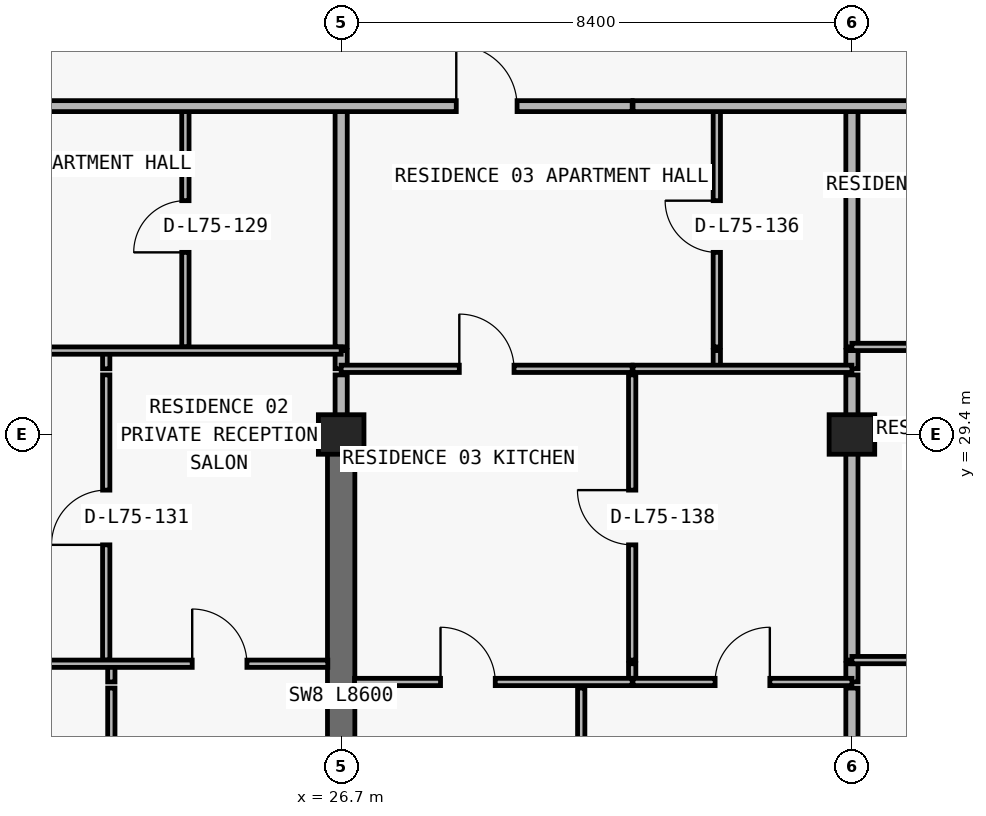
"""IFC4 building model, lengths in metres.
Left out: names, types, materials, properties, quantities, classifications, styles, units other than length and angle.
Written with IfcOpenShell. Run it as: python <this file> out.ifc"""

import sys

from ifc_helpers import new_model, si_unit, direction, frame, frame_2d, origin, origin_2d, place, context, subcontext, project, spatial, rectangle, extrude, element, fill, save


model = new_model("IFC4")
c1 = context("Model", 3, precision=1e-05, world=origin(), true_north=direction((0.0, 1.0)))
c2 = subcontext(c1, "Body", "Model", "MODEL_VIEW")
j1 = project(units=[si_unit("LENGTHUNIT", "METRE"), si_unit("PLANEANGLEUNIT", "RADIAN")], contexts=[c1])
p1 = place(None, origin())
s1 = spatial("IfcSite", under=j1, at=p1, CompositionType="ELEMENT")
p2 = place(p1, origin())
s2 = spatial("IfcBuilding", under=s1, at=p2, CompositionType="ELEMENT")
p3 = place(p2, frame((0.0, 0.0, 266.1)))
s3 = spatial("IfcBuildingStorey", under=s2, at=p3, CompositionType="ELEMENT", Elevation=266.1)
for number, where, z_axis, x_axis in (
    (1, (26.7, 29.4, 0.0), (0.0, 0.0, 1.0), (1.0, 0.0, 0.0)),
    (2, (35.1, 29.4, 0.0), (0.0, 0.0, 1.0), (1.0, 0.0, 0.0)),
):
    element("IfcColumn", number, at=place(p3, frame(where, z_axis=z_axis, x_axis=x_axis)), inside=s3, PredefinedType="COLUMN", context=c2, shape_type="SweptSolid", body=[
        extrude(rectangle(XDim=0.75, YDim=0.65, at=origin_2d()), origin(), (0.0, 0.0, 1.0), 3.0),
    ])
p4 = place(p3, frame((26.7, 20.8, 0.0), z_axis=(0.0, 0.0, 1.0), x_axis=(0.0, 1.0, 0.0)))
e3 = element("IfcWall", 3, at=p4, inside=s3, PredefinedType="SHEAR", context=c2, shape_type="SweptSolid", body=[
    extrude(rectangle(XDim=8.6, YDim=0.45, at=frame_2d((4.3, 0.0))), origin(), (0.0, 0.0, 1.0), 3.0),
])
p5 = place(p3, frame((22.836, 25.69, 0.0), z_axis=(0.0, 0.0, 1.0), x_axis=(0.0, 1.0, 0.0)))
e4 = element("IfcWall", 4, at=p5, inside=s3, PredefinedType="PARTITIONING", context=c2, shape_type="SweptSolid", body=[
    extrude(rectangle(XDim=4.69, YDim=0.12, at=frame_2d((2.345, 0.0))), origin(), (0.0, 0.0, 1.0), 3.0),
])
p6 = place(p5, frame((1.895, 0.0, 0.0)))
e5 = element("IfcOpeningElement", 5, at=p6, cuts=e4, PredefinedType="OPENING", context=c2, shape_type="SweptSolid", body=[
    extrude(rectangle(XDim=0.9, YDim=2.15, at=frame_2d((0.45, 1.075))), frame((0.0, 0.07, 0.0), z_axis=(0.0, -1.0, 0.0), x_axis=(1.0, 0.0, 0.0)), (0.0, 0.0, 1.0), 0.14),
])
p7 = place(p3, frame((22.836, 30.48, 0.0), z_axis=(0.0, 0.0, 1.0), x_axis=(0.0, 1.0, 0.0)))
e6 = element("IfcWall", 6, at=p7, inside=s3, PredefinedType="PARTITIONING", context=c2, shape_type="SweptSolid", body=[
    extrude(rectangle(XDim=0.3, YDim=0.12, at=frame_2d((0.15, 0.0))), origin(), (0.0, 0.0, 1.0), 3.0),
])
p8 = place(p3, frame((22.92, 13.34, 0.0), z_axis=(0.0, 0.0, 1.0), x_axis=(0.0, 1.0, 0.0)))
e7 = element("IfcWall", 7, at=p8, inside=s3, PredefinedType="PARTITIONING", context=c2, shape_type="SweptSolid", body=[
    extrude(rectangle(XDim=11.89, YDim=0.12, at=frame_2d((5.945, 0.0))), origin(), (0.0, 0.0, 1.0), 3.0),
])
p9 = place(p3, frame((22.92, 25.33, 0.0), z_axis=(0.0, 0.0, 1.0), x_axis=(0.0, 1.0, 0.0)))
e8 = element("IfcWall", 8, at=p9, inside=s3, PredefinedType="PARTITIONING", context=c2, shape_type="SweptSolid", body=[
    extrude(rectangle(XDim=0.3, YDim=0.12, at=frame_2d((0.15, 0.0))), origin(), (0.0, 0.0, 1.0), 3.0),
])
p10 = place(p3, frame((24.138, 30.84, 0.0), z_axis=(0.0, 0.0, 1.0), x_axis=(0.0, 1.0, 0.0)))
e9 = element("IfcWall", 9, at=p10, inside=s3, PredefinedType="PARTITIONING", context=c2, shape_type="SweptSolid", body=[
    extrude(rectangle(XDim=3.96, YDim=0.12, at=frame_2d((1.98, 0.0))), origin(), (0.0, 0.0, 1.0), 3.0),
])
p11 = place(p10, frame((1.555, 0.0, 0.0)))
e10 = element("IfcOpeningElement", 10, at=p11, cuts=e9, PredefinedType="OPENING", context=c2, shape_type="SweptSolid", body=[
    extrude(rectangle(XDim=0.85, YDim=2.1, at=frame_2d((0.425, 1.05))), frame((0.0, 0.07, 0.0), z_axis=(0.0, -1.0, 0.0), x_axis=(1.0, 0.0, 0.0)), (0.0, 0.0, 1.0), 0.14),
])
p12 = place(p3, frame((26.7, 29.405, 0.0), z_axis=(0.0, 0.0, 1.0), x_axis=(0.0, 1.0, 0.0)))
e11 = element("IfcWall", 11, at=p12, inside=s3, PredefinedType="PARTITIONING", context=c2, shape_type="SweptSolid", body=[
    extrude(rectangle(XDim=0.975, YDim=0.2, at=frame_2d((0.487, 0.0))), origin(), (0.0, 0.0, 1.0), 2.285),
])
p13 = place(p3, frame((26.7, 30.48, 0.0), z_axis=(0.0, 0.0, 1.0), x_axis=(0.0, 1.0, 0.0)))
e12 = element("IfcWall", 12, at=p13, inside=s3, PredefinedType="PARTITIONING", context=c2, shape_type="SweptSolid", body=[
    extrude(rectangle(XDim=0.3, YDim=0.2, at=frame_2d((0.15, 0.0))), origin(), (0.0, 0.0, 1.0), 2.285),
])
p14 = place(p3, frame((26.7, 30.84, 0.0), z_axis=(0.0, 0.0, 1.0), x_axis=(0.0, 1.0, 0.0)))
e13 = element("IfcWall", 13, at=p14, inside=s3, PredefinedType="PARTITIONING", context=c2, shape_type="SweptSolid", body=[
    extrude(rectangle(XDim=3.96, YDim=0.2, at=frame_2d((1.98, 0.0))), origin(), (0.0, 0.0, 1.0), 2.285),
])
p15 = place(p3, frame((30.648, 13.34, 0.0), z_axis=(0.0, 0.0, 1.0), x_axis=(0.0, 1.0, 0.0)))
e14 = element("IfcWall", 14, at=p15, inside=s3, PredefinedType="PARTITIONING", context=c2, shape_type="SweptSolid", body=[
    extrude(rectangle(XDim=11.89, YDim=0.12, at=frame_2d((5.945, 0.0))), origin(), (0.0, 0.0, 1.0), 3.0),
])
p16 = place(p3, frame((31.486, 25.33, 0.0), z_axis=(0.0, 0.0, 1.0), x_axis=(0.0, 1.0, 0.0)))
e15 = element("IfcWall", 15, at=p16, inside=s3, PredefinedType="PARTITIONING", context=c2, shape_type="SweptSolid", body=[
    extrude(rectangle(XDim=0.3, YDim=0.12, at=frame_2d((0.15, 0.0))), origin(), (0.0, 0.0, 1.0), 3.0),
])
p17 = place(p3, frame((31.486, 25.69, 0.0), z_axis=(0.0, 0.0, 1.0), x_axis=(0.0, 1.0, 0.0)))
e16 = element("IfcWall", 16, at=p17, inside=s3, PredefinedType="PARTITIONING", context=c2, shape_type="SweptSolid", body=[
    extrude(rectangle(XDim=4.69, YDim=0.12, at=frame_2d((2.345, 0.0))), origin(), (0.0, 0.0, 1.0), 3.0),
])
p18 = place(p17, frame((1.895, 0.0, 0.0)))
e17 = element("IfcOpeningElement", 17, at=p18, cuts=e16, PredefinedType="OPENING", context=c2, shape_type="SweptSolid", body=[
    extrude(rectangle(XDim=0.9, YDim=2.15, at=frame_2d((0.45, 1.075))), frame((0.0, 0.07, 0.0), z_axis=(0.0, -1.0, 0.0), x_axis=(1.0, 0.0, 0.0)), (0.0, 0.0, 1.0), 0.14),
])
p19 = place(p3, frame((32.878, 30.48, 0.0), z_axis=(0.0, 0.0, 1.0), x_axis=(0.0, 1.0, 0.0)))
e18 = element("IfcWall", 18, at=p19, inside=s3, PredefinedType="PARTITIONING", context=c2, shape_type="SweptSolid", body=[
    extrude(rectangle(XDim=0.3, YDim=0.12, at=frame_2d((0.15, 0.0))), origin(), (0.0, 0.0, 1.0), 3.0),
])
p20 = place(p3, frame((32.878, 30.84, 0.0), z_axis=(0.0, 0.0, 1.0), x_axis=(0.0, 1.0, 0.0)))
e19 = element("IfcWall", 19, at=p20, inside=s3, PredefinedType="PARTITIONING", context=c2, shape_type="SweptSolid", body=[
    extrude(rectangle(XDim=3.96, YDim=0.12, at=frame_2d((1.98, 0.0))), origin(), (0.0, 0.0, 1.0), 3.0),
])
p21 = place(p20, frame((1.555, 0.0, 0.0)))
e20 = element("IfcOpeningElement", 20, at=p21, cuts=e19, PredefinedType="OPENING", context=c2, shape_type="SweptSolid", body=[
    extrude(rectangle(XDim=0.85, YDim=2.1, at=frame_2d((0.425, 1.05))), frame((0.0, 0.07, 0.0), z_axis=(0.0, -1.0, 0.0), x_axis=(1.0, 0.0, 0.0)), (0.0, 0.0, 1.0), 0.14),
])
p22 = place(p3, frame((35.1, 13.34, 0.0), z_axis=(0.0, 0.0, 1.0), x_axis=(0.0, 1.0, 0.0)))
e21 = element("IfcWall", 21, at=p22, inside=s3, PredefinedType="PARTITIONING", context=c2, shape_type="SweptSolid", body=[
    extrude(rectangle(XDim=11.89, YDim=0.2, at=frame_2d((5.945, 0.0))), origin(), (0.0, 0.0, 1.0), 2.213),
])
p23 = place(p3, frame((35.1, 25.33, 0.0), z_axis=(0.0, 0.0, 1.0), x_axis=(0.0, 1.0, 0.0)))
e22 = element("IfcWall", 22, at=p23, inside=s3, PredefinedType="PARTITIONING", context=c2, shape_type="SweptSolid", body=[
    extrude(rectangle(XDim=0.3, YDim=0.2, at=frame_2d((0.15, 0.0))), origin(), (0.0, 0.0, 1.0), 2.213),
])
p24 = place(p3, frame((35.1, 25.69, 0.0), z_axis=(0.0, 0.0, 1.0), x_axis=(0.0, 1.0, 0.0)))
e23 = element("IfcWall", 23, at=p24, inside=s3, PredefinedType="PARTITIONING", context=c2, shape_type="SweptSolid", body=[
    extrude(rectangle(XDim=4.69, YDim=0.2, at=frame_2d((2.345, 0.0))), origin(), (0.0, 0.0, 1.0), 2.213),
])
p25 = place(p3, frame((35.1, 30.48, 0.0), z_axis=(0.0, 0.0, 1.0), x_axis=(0.0, 1.0, 0.0)))
e24 = element("IfcWall", 24, at=p25, inside=s3, PredefinedType="PARTITIONING", context=c2, shape_type="SweptSolid", body=[
    extrude(rectangle(XDim=0.3, YDim=0.2, at=frame_2d((0.15, 0.0))), origin(), (0.0, 0.0, 1.0), 2.213),
])
p26 = place(p3, frame((35.1, 30.84, 0.0), z_axis=(0.0, 0.0, 1.0), x_axis=(0.0, 1.0, 0.0)))
e25 = element("IfcWall", 25, at=p26, inside=s3, PredefinedType="PARTITIONING", context=c2, shape_type="SweptSolid", body=[
    extrude(rectangle(XDim=3.96, YDim=0.2, at=frame_2d((1.98, 0.0))), origin(), (0.0, 0.0, 1.0), 2.213),
])
p27 = place(p3, frame((26.92, 25.33, 0.0), z_axis=(0.0, 0.0, 1.0), x_axis=(1.0, 0.0, 0.0)))
e26 = element("IfcWall", 26, at=p27, inside=s3, PredefinedType="PARTITIONING", context=c2, shape_type="SweptSolid", body=[
    extrude(rectangle(XDim=4.566, YDim=0.12, at=frame_2d((2.283, 0.0))), origin(), (0.0, 0.0, 1.0), 3.0),
])
p28 = place(p27, frame((1.414, 0.0, 0.0)))
e27 = element("IfcOpeningElement", 27, at=p28, cuts=e26, PredefinedType="OPENING", context=c2, shape_type="SweptSolid", body=[
    extrude(rectangle(XDim=0.9, YDim=2.15, at=frame_2d((0.45, 1.075))), frame((0.0, 0.07, 0.0), z_axis=(0.0, -1.0, 0.0), x_axis=(1.0, 0.0, 0.0)), (0.0, 0.0, 1.0), 0.14),
])
p29 = place(p3, frame((31.5, 25.33, 0.0), z_axis=(0.0, 0.0, 1.0), x_axis=(1.0, 0.0, 0.0)))
e28 = element("IfcWall", 28, at=p29, inside=s3, PredefinedType="PARTITIONING", context=c2, shape_type="SweptSolid", body=[
    extrude(rectangle(XDim=3.6, YDim=0.12, at=frame_2d((1.8, 0.0))), origin(), (0.0, 0.0, 1.0), 3.0),
])
p30 = place(p29, frame((1.35, 0.0, 0.0)))
e29 = element("IfcOpeningElement", 29, at=p30, cuts=e28, PredefinedType="OPENING", context=c2, shape_type="SweptSolid", body=[
    extrude(rectangle(XDim=0.9, YDim=2.15, at=frame_2d((0.45, 1.075))), frame((0.0, 0.07, 0.0), z_axis=(0.0, -1.0, 0.0), x_axis=(1.0, 0.0, 0.0)), (0.0, 0.0, 1.0), 0.14),
])
p31 = place(p3, frame((18.3, 25.63, 0.0), z_axis=(0.0, 0.0, 1.0), x_axis=(1.0, 0.0, 0.0)))
e30 = element("IfcWall", 30, at=p31, inside=s3, PredefinedType="PARTITIONING", context=c2, shape_type="SweptSolid", body=[
    extrude(rectangle(XDim=8.18, YDim=0.12, at=frame_2d((4.09, 0.0))), origin(), (0.0, 0.0, 1.0), 3.0),
])
p32 = place(p31, frame((1.818, 0.0, 0.0)))
e31 = element("IfcOpeningElement", 31, at=p32, cuts=e30, PredefinedType="OPENING", context=c2, shape_type="SweptSolid", body=[
    extrude(rectangle(XDim=0.9, YDim=2.15, at=frame_2d((0.45, 1.075))), frame((0.0, 0.07, 0.0), z_axis=(0.0, -1.0, 0.0), x_axis=(1.0, 0.0, 0.0)), (0.0, 0.0, 1.0), 0.14),
])
p33 = place(p31, frame((5.95, 0.0, 0.0)))
e32 = element("IfcOpeningElement", 32, at=p33, cuts=e30, PredefinedType="OPENING", context=c2, shape_type="SweptSolid", body=[
    extrude(rectangle(XDim=0.9, YDim=2.15, at=frame_2d((0.45, 1.075))), frame((0.0, 0.07, 0.0), z_axis=(0.0, -1.0, 0.0), x_axis=(1.0, 0.0, 0.0)), (0.0, 0.0, 1.0), 0.14),
])
p34 = place(p3, frame((35.1, 25.69, 0.0), z_axis=(0.0, 0.0, 1.0), x_axis=(1.0, 0.0, 0.0)))
e33 = element("IfcWall", 33, at=p34, inside=s3, PredefinedType="PARTITIONING", context=c2, shape_type="SweptSolid", body=[
    extrude(rectangle(XDim=7.6, YDim=0.12, at=frame_2d((3.8, 0.0))), origin(), (0.0, 0.0, 1.0), 3.0),
])
p35 = place(p34, frame((1.477, 0.0, 0.0)))
e34 = element("IfcOpeningElement", 34, at=p35, cuts=e33, PredefinedType="OPENING", context=c2, shape_type="SweptSolid", body=[
    extrude(rectangle(XDim=0.9, YDim=2.15, at=frame_2d((0.45, 1.075))), frame((0.0, 0.07, 0.0), z_axis=(0.0, -1.0, 0.0), x_axis=(1.0, 0.0, 0.0)), (0.0, 0.0, 1.0), 0.14),
])
p36 = place(p34, frame((5.44, 0.0, 0.0)))
e35 = element("IfcOpeningElement", 35, at=p36, cuts=e33, PredefinedType="OPENING", context=c2, shape_type="SweptSolid", body=[
    extrude(rectangle(XDim=0.9, YDim=2.15, at=frame_2d((0.45, 1.075))), frame((0.0, 0.07, 0.0), z_axis=(0.0, -1.0, 0.0), x_axis=(1.0, 0.0, 0.0)), (0.0, 0.0, 1.0), 0.14),
])
p37 = place(p3, frame((26.7, 30.48, 0.0), z_axis=(0.0, 0.0, 1.0), x_axis=(1.0, 0.0, 0.0)))
e36 = element("IfcWall", 36, at=p37, inside=s3, PredefinedType="PARTITIONING", context=c2, shape_type="SweptSolid", body=[
    extrude(rectangle(XDim=4.786, YDim=0.12, at=frame_2d((2.393, 0.0))), origin(), (0.0, 0.0, 1.0), 3.0),
])
p38 = place(p37, frame((1.943, 0.0, 0.0)))
e37 = element("IfcOpeningElement", 37, at=p38, cuts=e36, PredefinedType="OPENING", context=c2, shape_type="SweptSolid", body=[
    extrude(rectangle(XDim=0.9, YDim=2.15, at=frame_2d((0.45, 1.075))), frame((0.0, 0.07, 0.0), z_axis=(0.0, -1.0, 0.0), x_axis=(1.0, 0.0, 0.0)), (0.0, 0.0, 1.0), 0.14),
])
p39 = place(p3, frame((31.5, 30.48, 0.0), z_axis=(0.0, 0.0, 1.0), x_axis=(1.0, 0.0, 0.0)))
e38 = element("IfcWall", 38, at=p39, inside=s3, PredefinedType="PARTITIONING", context=c2, shape_type="SweptSolid", body=[
    extrude(rectangle(XDim=3.6, YDim=0.12, at=frame_2d((1.8, 0.0))), origin(), (0.0, 0.0, 1.0), 3.0),
])
p40 = place(p3, frame((18.3, 30.78, 0.0), z_axis=(0.0, 0.0, 1.0), x_axis=(1.0, 0.0, 0.0)))
e39 = element("IfcWall", 39, at=p40, inside=s3, PredefinedType="PARTITIONING", context=c2, shape_type="SweptSolid", body=[
    extrude(rectangle(XDim=8.4, YDim=0.12, at=frame_2d((4.2, 0.0))), origin(), (0.0, 0.0, 1.0), 3.0),
])
p41 = place(p40, frame((1.818, 0.0, 0.0)))
e40 = element("IfcOpeningElement", 40, at=p41, cuts=e39, PredefinedType="OPENING", context=c2, shape_type="SweptSolid", body=[
    extrude(rectangle(XDim=0.9, YDim=2.15, at=frame_2d((0.45, 1.075))), frame((0.0, 0.07, 0.0), z_axis=(0.0, -1.0, 0.0), x_axis=(1.0, 0.0, 0.0)), (0.0, 0.0, 1.0), 0.14),
])
p42 = place(p3, frame((35.1, 30.84, 0.0), z_axis=(0.0, 0.0, 1.0), x_axis=(1.0, 0.0, 0.0)))
e41 = element("IfcWall", 41, at=p42, inside=s3, PredefinedType="PARTITIONING", context=c2, shape_type="SweptSolid", body=[
    extrude(rectangle(XDim=7.6, YDim=0.12, at=frame_2d((3.8, 0.0))), origin(), (0.0, 0.0, 1.0), 3.0),
])
p43 = place(p42, frame((1.477, 0.0, 0.0)))
e42 = element("IfcOpeningElement", 42, at=p43, cuts=e41, PredefinedType="OPENING", context=c2, shape_type="SweptSolid", body=[
    extrude(rectangle(XDim=0.9, YDim=2.15, at=frame_2d((0.45, 1.075))), frame((0.0, 0.07, 0.0), z_axis=(0.0, -1.0, 0.0), x_axis=(1.0, 0.0, 0.0)), (0.0, 0.0, 1.0), 0.14),
])
p44 = place(p3, frame((15.203, 34.8, 0.0), z_axis=(0.0, 0.0, 1.0), x_axis=(1.0, 0.0, 0.0)))
e43 = element("IfcWall", 43, at=p44, inside=s3, PredefinedType="PARTITIONING", context=c2, shape_type="SweptSolid", body=[
    extrude(rectangle(XDim=16.283, YDim=0.18, at=frame_2d((8.142, 0.0))), origin(), (0.0, 0.0, 1.0), 3.0),
])
p45 = place(p44, frame((5.516, 0.0, 0.0)))
e44 = element("IfcOpeningElement", 44, at=p45, cuts=e43, PredefinedType="OPENING", context=c2, shape_type="SweptSolid", body=[
    extrude(rectangle(XDim=1.0, YDim=2.2, at=frame_2d((0.5, 1.1))), frame((0.0, 0.1, 0.0), z_axis=(0.0, -1.0, 0.0), x_axis=(1.0, 0.0, 0.0)), (0.0, 0.0, 1.0), 0.2),
])
p46 = place(p44, frame((13.39, 0.0, 0.0)))
e45 = element("IfcOpeningElement", 45, at=p46, cuts=e43, PredefinedType="OPENING", context=c2, shape_type="SweptSolid", body=[
    extrude(rectangle(XDim=1.0, YDim=2.2, at=frame_2d((0.5, 1.1))), frame((0.0, 0.1, 0.0), z_axis=(0.0, -1.0, 0.0), x_axis=(1.0, 0.0, 0.0)), (0.0, 0.0, 1.0), 0.2),
])
p47 = place(p3, frame((31.5, 34.8, 0.0), z_axis=(0.0, 0.0, 1.0), x_axis=(1.0, 0.0, 0.0)))
e46 = element("IfcWall", 46, at=p47, inside=s3, PredefinedType="PARTITIONING", context=c2, shape_type="SweptSolid", body=[
    extrude(rectangle(XDim=34.2, YDim=0.18, at=frame_2d((17.1, 0.0))), origin(), (0.0, 0.0, 1.0), 3.0),
])
p48 = place(p47, frame((5.6, 0.0, 0.0)))
e47 = element("IfcOpeningElement", 47, at=p48, cuts=e46, PredefinedType="OPENING", context=c2, shape_type="SweptSolid", body=[
    extrude(rectangle(XDim=1.0, YDim=2.2, at=frame_2d((0.5, 1.1))), frame((0.0, 0.1, 0.0), z_axis=(0.0, -1.0, 0.0), x_axis=(1.0, 0.0, 0.0)), (0.0, 0.0, 1.0), 0.2),
])
p49 = place(p47, frame((13.799, 0.0, 0.0)))
e48 = element("IfcOpeningElement", 48, at=p49, cuts=e46, PredefinedType="OPENING", context=c2, shape_type="SweptSolid", body=[
    extrude(rectangle(XDim=1.0, YDim=2.2, at=frame_2d((0.5, 1.1))), frame((0.0, 0.1, 0.0), z_axis=(0.0, -1.0, 0.0), x_axis=(1.0, 0.0, 0.0)), (0.0, 0.0, 1.0), 0.2),
])
p50 = place(p47, frame((22.483, 0.0, 0.0)))
e49 = element("IfcOpeningElement", 49, at=p50, cuts=e46, PredefinedType="OPENING", context=c2, shape_type="SweptSolid", body=[
    extrude(rectangle(XDim=1.0, YDim=2.2, at=frame_2d((0.5, 1.1))), frame((0.0, 0.1, 0.0), z_axis=(0.0, -1.0, 0.0), x_axis=(1.0, 0.0, 0.0)), (0.0, 0.0, 1.0), 0.2),
])
p51 = place(p11, origin())
e50 = element("IfcDoor", 50, at=p51, inside=s3, OperationType="SINGLE_SWING_LEFT", PredefinedType="DOOR", context=c2, shape_type="SweptSolid", body=[
    extrude(rectangle(XDim=0.85, YDim=2.1, at=frame_2d((0.425, 1.05))), frame((0.0, 0.025, 0.0), z_axis=(0.0, -1.0, 0.0), x_axis=(1.0, 0.0, 0.0)), (0.0, 0.0, 1.0), 0.05),
])
fill(e10, e50)
p52 = place(p6, origin())
e51 = element("IfcDoor", 51, at=p52, inside=s3, OperationType="SINGLE_SWING_LEFT", PredefinedType="DOOR", context=c2, shape_type="SweptSolid", body=[
    extrude(rectangle(XDim=0.9, YDim=2.15, at=frame_2d((0.45, 1.075))), frame((0.0, 0.025, 0.0), z_axis=(0.0, -1.0, 0.0), x_axis=(1.0, 0.0, 0.0)), (0.0, 0.0, 1.0), 0.05),
])
fill(e5, e51)
p53 = place(p33, origin())
e52 = element("IfcDoor", 52, at=p53, inside=s3, OperationType="SINGLE_SWING_LEFT", PredefinedType="DOOR", context=c2, shape_type="SweptSolid", body=[
    extrude(rectangle(XDim=0.9, YDim=2.15, at=frame_2d((0.45, 1.075))), frame((0.0, 0.025, 0.0), z_axis=(0.0, -1.0, 0.0), x_axis=(1.0, 0.0, 0.0)), (0.0, 0.0, 1.0), 0.05),
])
fill(e32, e52)
p54 = place(p46, origin())
e53 = element("IfcDoor", 53, at=p54, inside=s3, OperationType="SINGLE_SWING_LEFT", PredefinedType="DOOR", context=c2, shape_type="SweptSolid", body=[
    extrude(rectangle(XDim=1.0, YDim=2.2, at=frame_2d((0.5, 1.1))), frame((0.0, 0.025, 0.0), z_axis=(0.0, -1.0, 0.0), x_axis=(1.0, 0.0, 0.0)), (0.0, 0.0, 1.0), 0.05),
])
fill(e45, e53)
p55 = place(p21, origin())
e54 = element("IfcDoor", 54, at=p55, inside=s3, OperationType="SINGLE_SWING_RIGHT", PredefinedType="DOOR", context=c2, shape_type="SweptSolid", body=[
    extrude(rectangle(XDim=0.85, YDim=2.1, at=frame_2d((0.425, 1.05))), frame((0.0, 0.025, 0.0), z_axis=(0.0, -1.0, 0.0), x_axis=(1.0, 0.0, 0.0)), (0.0, 0.0, 1.0), 0.05),
])
fill(e20, e54)
p56 = place(p38, origin())
e55 = element("IfcDoor", 55, at=p56, inside=s3, OperationType="SINGLE_SWING_LEFT", PredefinedType="DOOR", context=c2, shape_type="SweptSolid", body=[
    extrude(rectangle(XDim=0.9, YDim=2.15, at=frame_2d((0.45, 1.075))), frame((0.0, 0.025, 0.0), z_axis=(0.0, -1.0, 0.0), x_axis=(1.0, 0.0, 0.0)), (0.0, 0.0, 1.0), 0.05),
])
fill(e37, e55)
p57 = place(p18, origin())
e56 = element("IfcDoor", 56, at=p57, inside=s3, OperationType="SINGLE_SWING_RIGHT", PredefinedType="DOOR", context=c2, shape_type="SweptSolid", body=[
    extrude(rectangle(XDim=0.9, YDim=2.15, at=frame_2d((0.45, 1.075))), frame((0.0, 0.025, 0.0), z_axis=(0.0, -1.0, 0.0), x_axis=(1.0, 0.0, 0.0)), (0.0, 0.0, 1.0), 0.05),
])
fill(e17, e56)
p58 = place(p28, origin())
e57 = element("IfcDoor", 57, at=p58, inside=s3, OperationType="SINGLE_SWING_LEFT", PredefinedType="DOOR", context=c2, shape_type="SweptSolid", body=[
    extrude(rectangle(XDim=0.9, YDim=2.15, at=frame_2d((0.45, 1.075))), frame((0.0, 0.025, 0.0), z_axis=(0.0, -1.0, 0.0), x_axis=(1.0, 0.0, 0.0)), (0.0, 0.0, 1.0), 0.05),
])
fill(e27, e57)
p59 = place(p30, origin())
e58 = element("IfcDoor", 58, at=p59, inside=s3, OperationType="SINGLE_SWING_RIGHT", PredefinedType="DOOR", context=c2, shape_type="SweptSolid", body=[
    extrude(rectangle(XDim=0.9, YDim=2.15, at=frame_2d((0.45, 1.075))), frame((0.0, 0.025, 0.0), z_axis=(0.0, -1.0, 0.0), x_axis=(1.0, 0.0, 0.0)), (0.0, 0.0, 1.0), 0.05),
])
fill(e29, e58)
save(model, sys.argv[1])
